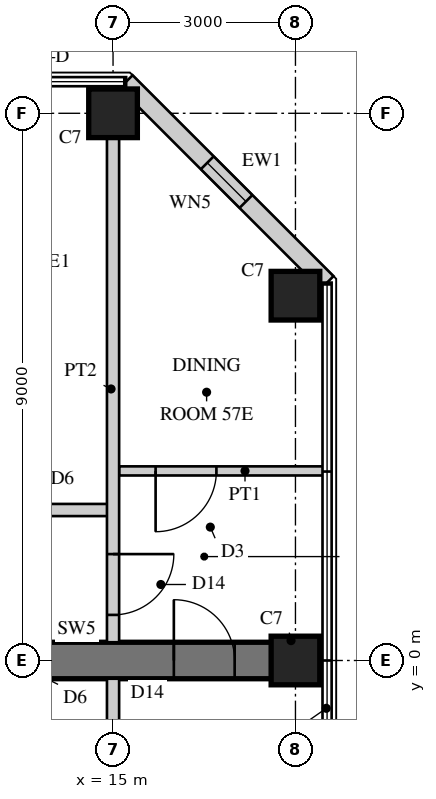
"""IFC4 building model, lengths in metres.
Left out: names, types, materials, properties, quantities, classifications, styles, units other than length and angle.
Written with IfcOpenShell. Run it as: python <this file> out.ifc"""

import sys

from ifc_helpers import new_model, si_unit, direction, frame, frame_2d, origin, origin_2d, place, context, subcontext, project, spatial, rectangle, hollow_rectangle, extrude, element, fill, save


model = new_model("IFC4")
c1 = context("Model", 3, precision=1e-05, world=origin(), true_north=direction((0.0, 1.0)))
c2 = subcontext(c1, "Body", "Model", "MODEL_VIEW")
j1 = project(units=[si_unit("LENGTHUNIT", "METRE"), si_unit("PLANEANGLEUNIT", "RADIAN")], contexts=[c1])
p1 = place(None, origin())
s1 = spatial("IfcSite", under=j1, at=p1, CompositionType="ELEMENT")
p2 = place(p1, origin())
s2 = spatial("IfcBuilding", under=s1, at=p2, CompositionType="ELEMENT")
p3 = place(p2, frame((0.0, 0.0, 225.5)))
s3 = spatial("IfcBuildingStorey", under=s2, at=p3, CompositionType="ELEMENT", Elevation=225.5)
p4 = place(p3, frame((9.0, 0.0, 0.0), z_axis=(0.0, 0.0, 1.0), x_axis=(1.0, 0.0, 0.0)))
e1 = element("IfcWall", 1, at=p4, inside=s3, PredefinedType="SHEAR", context=c2, shape_type="SweptSolid", body=[
    extrude(rectangle(XDim=9.0, YDim=0.6, at=frame_2d((4.5, 0.0))), origin(), (0.0, 0.0, 1.0), 3.4),
])
p5 = place(p4, frame((3.8, 0.0, 0.0)))
e2 = element("IfcOpeningElement", 2, at=p5, cuts=e1, PredefinedType="OPENING", context=c2, shape_type="SweptSolid", body=[
    extrude(rectangle(XDim=1.0, YDim=2.15, at=frame_2d((0.5, 1.075))), frame((0.0, 0.31, 0.0), z_axis=(0.0, -1.0, 0.0), x_axis=(1.0, 0.0, 0.0)), (0.0, 0.0, 1.0), 0.62),
])
p6 = place(p4, frame((7.0, 0.0, 0.0)))
e3 = element("IfcOpeningElement", 3, at=p6, cuts=e1, PredefinedType="OPENING", context=c2, shape_type="SweptSolid", body=[
    extrude(rectangle(XDim=1.0, YDim=2.2, at=frame_2d((0.5, 1.1))), frame((0.0, 0.31, 0.0), z_axis=(0.0, -1.0, 0.0), x_axis=(1.0, 0.0, 0.0)), (0.0, 0.0, 1.0), 0.62),
])
for number, where, z_axis, x_axis in (
    (4, (15.0, 9.0, 0.0), (0.0, 0.0, 1.0), (1.0, 0.0, 0.0)),
    (5, (18.0, 0.0, 0.0), (0.0, 0.0, 1.0), (1.0, 0.0, 0.0)),
    (6, (18.0, 6.0, 0.0), (0.0, 0.0, 1.0), (1.0, 0.0, 0.0)),
):
    element("IfcColumn", number, at=place(p3, frame(where, z_axis=z_axis, x_axis=x_axis)), inside=s3, PredefinedType="COLUMN", context=c2, shape_type="SweptSolid", body=[
        extrude(rectangle(XDim=0.8, YDim=0.8, at=origin_2d()), origin(), (0.0, 0.0, 1.0), 3.4),
    ])
p7 = place(p3, frame((18.52, 6.215, 0.0), z_axis=(0.0, 0.0, 1.0), x_axis=(-0.707106781187, 0.707106781187, 0.0)))
e7 = element("IfcWall", 7, at=p7, inside=s3, PredefinedType="SOLIDWALL", context=c2, shape_type="SweptSolid", body=[
    extrude(rectangle(XDim=4.674, YDim=0.3, at=frame_2d((2.337, 0.0))), origin(), (0.0, 0.0, 1.0), 3.22),
])
p8 = place(p7, frame((1.887, 0.0, 0.3)))
e8 = element("IfcOpeningElement", 8, at=p8, cuts=e7, PredefinedType="OPENING", context=c2, shape_type="SweptSolid", body=[
    extrude(rectangle(XDim=0.9, YDim=2.4, at=frame_2d((0.45, 1.2))), frame((0.0, 0.16, 0.0), z_axis=(0.0, -1.0, 0.0), x_axis=(1.0, 0.0, 0.0)), (0.0, 0.0, 1.0), 0.32),
])
p9 = place(p3, frame((9.4, 2.475, 0.0), z_axis=(0.0, 0.0, 1.0), x_axis=(1.0, 0.0, 0.0)))
e9 = element("IfcWall", 9, at=p9, inside=s3, PredefinedType="SOLIDWALL", context=c2, shape_type="SweptSolid", body=[
    extrude(rectangle(XDim=5.6, YDim=0.2, at=frame_2d((2.8, 0.0))), origin(), (0.0, 0.0, 1.0), 3.22),
])
p10 = place(p9, frame((3.4, 0.0, 0.0)))
e10 = element("IfcOpeningElement", 10, at=p10, cuts=e9, PredefinedType="OPENING", context=c2, shape_type="SweptSolid", body=[
    extrude(rectangle(XDim=1.0, YDim=2.15, at=frame_2d((0.5, 1.075))), frame((0.0, 0.11, 0.0), z_axis=(0.0, -1.0, 0.0), x_axis=(1.0, 0.0, 0.0)), (0.0, 0.0, 1.0), 0.22),
])
p11 = place(p3, frame((15.1, 3.118, 0.0), z_axis=(0.0, 0.0, 1.0), x_axis=(1.0, 0.0, 0.0)))
e11 = element("IfcWall", 11, at=p11, inside=s3, PredefinedType="PARTITIONING", context=c2, shape_type="SweptSolid", body=[
    extrude(rectangle(XDim=3.38, YDim=0.15, at=frame_2d((1.69, 0.0))), origin(), (0.0, 0.0, 1.0), 3.22),
])
p12 = place(p11, frame((0.6, 0.0, 0.0)))
e12 = element("IfcOpeningElement", 12, at=p12, cuts=e11, PredefinedType="OPENING", context=c2, shape_type="SweptSolid", body=[
    extrude(rectangle(XDim=1.0, YDim=2.1, at=frame_2d((0.5, 1.05))), frame((0.0, 0.085, 0.0), z_axis=(0.0, -1.0, 0.0), x_axis=(1.0, 0.0, 0.0)), (0.0, 0.0, 1.0), 0.17),
])
p13 = place(p3, frame((15.0, -8.6, 0.0), z_axis=(0.0, 0.0, 1.0), x_axis=(0.0, 1.0, 0.0)))
e13 = element("IfcWall", 13, at=p13, inside=s3, PredefinedType="SOLIDWALL", context=c2, shape_type="SweptSolid", body=[
    extrude(rectangle(XDim=8.3, YDim=0.2, at=frame_2d((4.15, 0.0))), origin(), (0.0, 0.0, 1.0), 2.52),
])
p14 = place(p3, frame((15.0, 0.3, 0.0), z_axis=(0.0, 0.0, 1.0), x_axis=(0.0, 1.0, 0.0)))
e14 = element("IfcWall", 14, at=p14, inside=s3, PredefinedType="SOLIDWALL", context=c2, shape_type="SweptSolid", body=[
    extrude(rectangle(XDim=8.3, YDim=0.2, at=frame_2d((4.15, 0.0))), origin(), (0.0, 0.0, 1.0), 2.52),
])
p15 = place(p14, frame((0.45, 0.0, 0.0)))
e15 = element("IfcOpeningElement", 15, at=p15, cuts=e14, PredefinedType="OPENING", context=c2, shape_type="SweptSolid", body=[
    extrude(rectangle(XDim=1.0, YDim=2.2, at=frame_2d((0.5, 1.1))), frame((0.0, 0.11, 0.0), z_axis=(0.0, -1.0, 0.0), x_axis=(1.0, 0.0, 0.0)), (0.0, 0.0, 1.0), 0.22),
])
p16 = place(p8, origin())
e16 = element("IfcWindow", 16, at=p16, inside=s3, PartitioningType="SINGLE_PANEL", PredefinedType="WINDOW", context=c2, shape_type="SweptSolid", body=[
    extrude(hollow_rectangle(XDim=0.9, YDim=2.4, WallThickness=0.06, at=frame_2d((0.45, 1.2))), frame((0.0, 0.03, 0.0), z_axis=(0.0, -1.0, 0.0), x_axis=(1.0, 0.0, 0.0)), (0.0, 0.0, 1.0), 0.06),
    extrude(rectangle(XDim=0.779, YDim=2.279, at=frame_2d((0.45, 1.2))), frame((0.0, 0.03, 0.0), z_axis=(0.0, -1.0, 0.0), x_axis=(1.0, 0.0, 0.0)), (0.0, 0.0, 1.0), 0.06),
])
fill(e8, e16)
p17 = place(p12, frame((1.0, 0.0, 0.0), z_axis=(0.0, 0.0, 1.0), x_axis=(-1.0, 0.0, 0.0)))
e17 = element("IfcDoor", 17, at=p17, inside=s3, OperationType="SINGLE_SWING_RIGHT", PredefinedType="DOOR", context=c2, shape_type="SweptSolid", body=[
    extrude(rectangle(XDim=1.0, YDim=2.1, at=frame_2d((0.5, 1.05))), frame((0.0, 0.025, 0.0), z_axis=(0.0, -1.0, 0.0), x_axis=(1.0, 0.0, 0.0)), (0.0, 0.0, 1.0), 0.05),
])
fill(e12, e17)
p18 = place(p15, frame((1.0, 0.0, 0.0), z_axis=(0.0, 0.0, 1.0), x_axis=(-1.0, 0.0, 0.0)))
e18 = element("IfcDoor", 18, at=p18, inside=s3, OperationType="SINGLE_SWING_LEFT", PredefinedType="DOOR", context=c2, shape_type="SweptSolid", body=[
    extrude(rectangle(XDim=1.0, YDim=2.2, at=frame_2d((0.5, 1.1))), frame((0.0, 0.025, 0.0), z_axis=(0.0, -1.0, 0.0), x_axis=(1.0, 0.0, 0.0)), (0.0, 0.0, 1.0), 0.05),
])
fill(e15, e18)
p19 = place(p6, origin())
e19 = element("IfcDoor", 19, at=p19, inside=s3, OperationType="SINGLE_SWING_LEFT", PredefinedType="DOOR", context=c2, shape_type="SweptSolid", body=[
    extrude(rectangle(XDim=1.0, YDim=2.2, at=frame_2d((0.5, 1.1))), frame((0.0, 0.025, 0.0), z_axis=(0.0, -1.0, 0.0), x_axis=(1.0, 0.0, 0.0)), (0.0, 0.0, 1.0), 0.05),
])
fill(e3, e19)
save(model, sys.argv[1])
